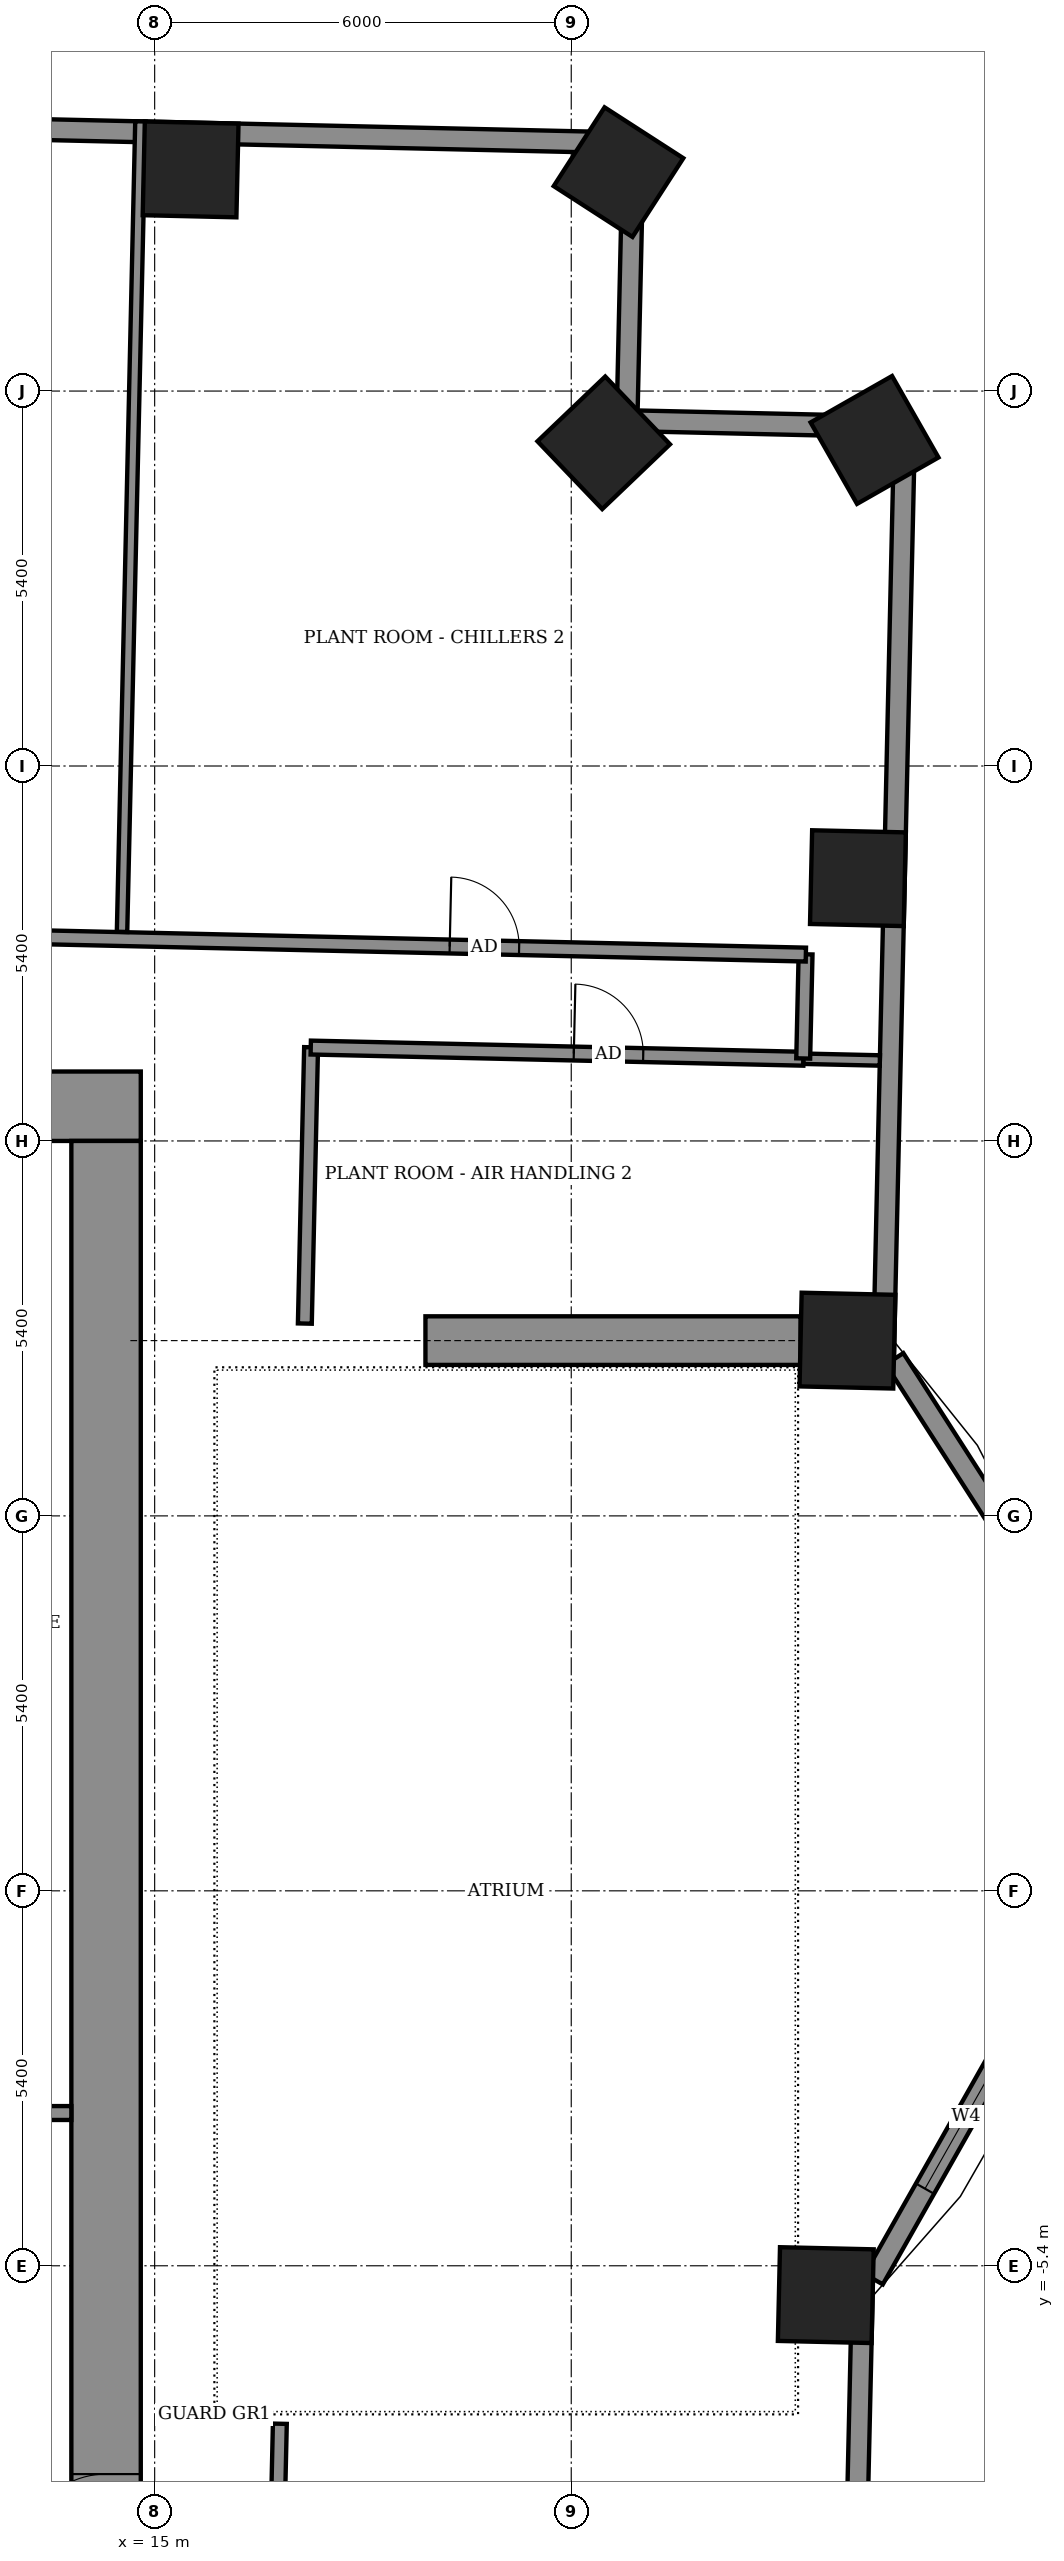
"""IFC4 building model, lengths in metres.
Left out: names, types, materials, properties, quantities, classifications, styles, units other than length and angle.
Written with IfcOpenShell. Run it as: python <this file> out.ifc"""

import sys

from ifc_helpers import new_model, si_unit, direction, frame, frame_2d, origin, origin_2d, place, context, subcontext, project, spatial, rectangle, extrude, element, fill, save


model = new_model("IFC4")
c1 = context("Model", 3, precision=1e-05, world=origin(), true_north=direction((0.0, 1.0)))
c2 = subcontext(c1, "Body", "Model", "MODEL_VIEW")
j1 = project(units=[si_unit("LENGTHUNIT", "METRE"), si_unit("PLANEANGLEUNIT", "RADIAN")], contexts=[c1])
p1 = place(None, origin())
s1 = spatial("IfcSite", under=j1, at=p1, CompositionType="ELEMENT")
p2 = place(p1, origin())
s2 = spatial("IfcBuilding", under=s1, at=p2, CompositionType="ELEMENT")
p3 = place(p2, frame((0.0, 0.0, 119.9)))
s3 = spatial("IfcBuildingStorey", under=s2, at=p3, CompositionType="ELEMENT", Elevation=119.9)
for number, where, z_axis, x_axis in (
    (1, (24.666, -5.823, -0.55), (0.0, 0.0, 1.0), (0.023, 1.0, 0.0)),
    (2, (24.978, 7.924, -0.55), (0.0, 0.0, 1.0), (0.023, 1.0, 0.0)),
    (3, (25.129, 14.584, -0.55), (0.0, 0.0, 1.0), (0.023, 1.0, 0.0)),
    (4, (25.369, 20.896, -0.55), (0.0, 0.0, 1.0), (-0.495, 0.869, 0.0)),
    (5, (21.468, 20.855, -0.55), (0.0, 0.0, 1.0), (-0.691, 0.723, 0.0)),
    (6, (21.681, 24.753, -0.55), (0.0, 0.0, 1.0), (-0.84, 0.542, 0.0)),
    (7, (15.518, 24.792, -0.55), (0.0, 0.0, 1.0), (-1.0, 0.023, 0.0)),
):
    element("IfcColumn", number, at=place(p3, frame(where, z_axis=z_axis, x_axis=x_axis)), inside=s3, PredefinedType="COLUMN", context=c2, shape_type="SweptSolid", body=[
        extrude(rectangle(XDim=1.35, YDim=1.35, at=origin_2d()), origin(), (0.0, 0.0, 1.0), 5.6),
    ])
p4 = place(p3, frame((18.9, 7.924, 0.0), z_axis=(0.0, 0.0, 1.0), x_axis=(1.0, 0.0, 0.0)))
e8 = element("IfcWall", 8, at=p4, inside=s3, PredefinedType="SHEAR", context=c2, shape_type="SweptSolid", body=[
    extrude(rectangle(XDim=5.403, YDim=0.7, at=frame_2d((2.702, 0.0))), origin(), (0.0, 0.0, 1.0), 3.0),
])
p5 = place(p3, frame((24.915, -18.007, 0.0), z_axis=(0.0, 0.0, 1.0), x_axis=(0.02263706344, 0.999743748847, 0.0)))
e9 = element("IfcWall", 9, at=p5, inside=s3, PredefinedType="SOLIDWALL", context=c2, shape_type="SweptSolid", body=[
    extrude(rectangle(XDim=12.23, YDim=0.3, at=frame_2d((6.115, 0.0))), origin(), (0.0, 0.0, 1.0), 5.05),
])
p6 = place(p3, frame((25.357, -5.594, 0.0), z_axis=(0.0, 0.0, 1.0), x_axis=(0.492589172415, 0.8702619762, 0.0)))
e10 = element("IfcWall", 10, at=p6, inside=s3, PredefinedType="SOLIDWALL", context=c2, shape_type="SweptSolid", body=[
    extrude(rectangle(XDim=5.398, YDim=0.3, at=frame_2d((2.699, 0.0))), origin(), (0.0, 0.0, 1.0), 5.05),
])
p7 = place(p6, frame((1.499, 0.0, 0.6)))
e11 = element("IfcOpeningElement", 11, at=p7, cuts=e10, PredefinedType="OPENING", context=c2, shape_type="SweptSolid", body=[
    extrude(rectangle(XDim=2.4, YDim=3.0, at=frame_2d((1.2, 1.5))), frame((0.0, 0.16, 0.0), z_axis=(0.0, -1.0, 0.0), x_axis=(1.0, 0.0, 0.0)), (0.0, 0.0, 1.0), 0.32),
])
p8 = place(p3, frame((27.586, 4.661, 0.0), z_axis=(0.0, 0.0, 1.0), x_axis=(-0.540553562828, 0.841309601582, 0.0)))
e12 = element("IfcWall", 12, at=p8, inside=s3, PredefinedType="SOLIDWALL", context=c2, shape_type="SweptSolid", body=[
    extrude(rectangle(XDim=3.568, YDim=0.3, at=frame_2d((1.784, 0.0))), origin(), (0.0, 0.0, 1.0), 5.05),
])
p9 = place(p3, frame((25.498, 7.691, 0.0), z_axis=(0.0, 0.0, 1.0), x_axis=(0.022690769161, 0.999742531352, 0.0)))
e13 = element("IfcWall", 13, at=p9, inside=s3, PredefinedType="SOLIDWALL", context=c2, shape_type="SweptSolid", body=[
    extrude(rectangle(XDim=13.396, YDim=0.3, at=frame_2d((6.698, 0.0))), origin(), (0.0, 0.0, 1.0), 5.05),
])
p10 = place(p3, frame((25.802, 21.083, 0.0), z_axis=(0.0, 0.0, 1.0), x_axis=(-0.999740826251, 0.022765770952, 0.0)))
e14 = element("IfcWall", 14, at=p10, inside=s3, PredefinedType="SOLIDWALL", context=c2, shape_type="SweptSolid", body=[
    extrude(rectangle(XDim=4.0, YDim=0.3, at=frame_2d((2.0, 0.0))), origin(), (0.0, 0.0, 1.0), 5.05),
])
p11 = place(p3, frame((21.792, 20.688, 0.0), z_axis=(0.0, 0.0, 1.0), x_axis=(0.022747364896, 0.999741245218, 0.0)))
e15 = element("IfcWall", 15, at=p11, inside=s3, PredefinedType="SOLIDWALL", context=c2, shape_type="SweptSolid", body=[
    extrude(rectangle(XDim=4.486, YDim=0.3, at=frame_2d((2.243, 0.0))), origin(), (0.0, 0.0, 1.0), 5.05),
])
p12 = place(p3, frame((21.894, 25.173, 0.0), z_axis=(0.0, 0.0, 1.0), x_axis=(-0.999742661083, 0.022685052594, 0.0)))
e16 = element("IfcWall", 16, at=p12, inside=s3, PredefinedType="SOLIDWALL", context=c2, shape_type="SweptSolid", body=[
    extrude(rectangle(XDim=45.309, YDim=0.3, at=frame_2d((22.654, 0.0))), origin(), (0.0, 0.0, 1.0), 5.05),
])
p13 = place(p3, frame((16.711, -11.738, 0.0), z_axis=(0.0, 0.0, 1.0), x_axis=(0.022647716762, 0.999743507569, 0.0)))
e17 = element("IfcWall", 17, at=p13, inside=s3, PredefinedType="PARTITIONING", context=c2, shape_type="SweptSolid", body=[
    extrude(rectangle(XDim=4.064, YDim=0.2, at=frame_2d((2.032, 0.0))), origin(), (0.0, 0.0, 1.0), 3.0),
])
p14 = place(p3, frame((17.163, 8.17, 0.0), z_axis=(0.0, 0.0, 1.0), x_axis=(0.022573703938, 0.999745181479, 0.0)))
e18 = element("IfcWall", 18, at=p14, inside=s3, PredefinedType="PARTITIONING", context=c2, shape_type="SweptSolid", body=[
    extrude(rectangle(XDim=3.98, YDim=0.2, at=frame_2d((1.99, 0.0))), origin(), (0.0, 0.0, 1.0), 3.0),
])
p15 = place(p3, frame((17.248, 12.145, 0.0), z_axis=(0.0, 0.0, 1.0), x_axis=(0.999742350192, -0.022698749566, 0.0)))
e19 = element("IfcWall", 19, at=p15, inside=s3, PredefinedType="PARTITIONING", context=c2, shape_type="SweptSolid", body=[
    extrude(rectangle(XDim=7.099, YDim=0.2, at=frame_2d((3.549, 0.0))), origin(), (0.0, 0.0, 1.0), 5.05),
])
p16 = place(p15, frame((3.79, 0.0, 0.0)))
e20 = element("IfcOpeningElement", 20, at=p16, cuts=e19, PredefinedType="OPENING", context=c2, shape_type="SweptSolid", body=[
    extrude(rectangle(XDim=1.0, YDim=2.1, at=frame_2d((0.5, 1.05))), frame((0.0, 0.11, 0.0), z_axis=(0.0, -1.0, 0.0), x_axis=(1.0, 0.0, 0.0)), (0.0, 0.0, 1.0), 0.22),
])
p17 = place(p3, frame((24.345, 11.984, 0.0), z_axis=(0.0, 0.0, 1.0), x_axis=(0.9997438932, -0.022630687329, 0.0)))
e21 = element("IfcWall", 21, at=p17, inside=s3, PredefinedType="PARTITIONING", context=c2, shape_type="SweptSolid", body=[
    extrude(rectangle(XDim=1.1, YDim=0.15, at=frame_2d((0.55, 0.0))), origin(), (0.0, 0.0, 1.0), 4.45),
])
p18 = place(p3, frame((24.341, 11.988, 0.0), z_axis=(0.0, 0.0, 1.0), x_axis=(0.022617910375, 0.999744182344, 0.0)))
e22 = element("IfcWall", 22, at=p18, inside=s3, PredefinedType="PARTITIONING", context=c2, shape_type="SweptSolid", body=[
    extrude(rectangle(XDim=1.5, YDim=0.2, at=frame_2d((0.75, 0.0))), origin(), (0.0, 0.0, 1.0), 5.05),
])
p19 = place(p3, frame((9.251, 13.827, 0.0), z_axis=(0.0, 0.0, 1.0), x_axis=(0.999743033601, -0.022668629562, 0.0)))
e23 = element("IfcWall", 23, at=p19, inside=s3, PredefinedType="PARTITIONING", context=c2, shape_type="SweptSolid", body=[
    extrude(rectangle(XDim=15.132, YDim=0.2, at=frame_2d((7.566, 0.0))), origin(), (0.0, 0.0, 1.0), 3.0),
])
p20 = place(p19, frame((10.001, 0.0, 0.0)))
e24 = element("IfcOpeningElement", 24, at=p20, cuts=e23, PredefinedType="OPENING", context=c2, shape_type="SweptSolid", body=[
    extrude(rectangle(XDim=1.0, YDim=2.1, at=frame_2d((0.5, 1.05))), frame((0.0, 0.11, 0.0), z_axis=(0.0, -1.0, 0.0), x_axis=(1.0, 0.0, 0.0)), (0.0, 0.0, 1.0), 0.22),
])
p21 = place(p19, frame((2.146, 0.0, 0.0)))
e25 = element("IfcOpeningElement", 25, at=p21, cuts=e23, PredefinedType="OPENING", context=c2, shape_type="SweptSolid", body=[
    extrude(rectangle(XDim=1.0, YDim=2.1, at=frame_2d((0.5, 1.05))), frame((0.0, 0.11, 0.0), z_axis=(0.0, -1.0, 0.0), x_axis=(1.0, 0.0, 0.0)), (0.0, 0.0, 1.0), 0.22),
])
p22 = place(p3, frame((14.53, 13.811, 0.0), z_axis=(0.0, 0.0, 1.0), x_axis=(0.022687206857, 0.999742612198, 0.0)))
e26 = element("IfcWall", 26, at=p22, inside=s3, PredefinedType="PARTITIONING", context=c2, shape_type="SweptSolid", body=[
    extrude(rectangle(XDim=11.676, YDim=0.15, at=frame_2d((5.838, 0.0))), origin(), (0.0, 0.0, 1.0), 4.45),
])
p23 = place(p3, frame((-14.8, 11.3, 0.0), z_axis=(0.0, 0.0, 1.0), x_axis=(1.0, 0.0, 0.0)))
e27 = element("IfcWall", 27, at=p23, inside=s3, PredefinedType="SHEAR", context=c2, shape_type="SweptSolid", body=[
    extrude(rectangle(XDim=29.6, YDim=1.0, at=frame_2d((14.8, 0.0))), origin(), (0.0, 0.0, 1.0), 5.6),
])
p24 = place(p3, frame((14.3, -10.8, 0.0), z_axis=(0.0, 0.0, 1.0), x_axis=(0.0, 1.0, 0.0)))
e28 = element("IfcWall", 28, at=p24, inside=s3, PredefinedType="SHEAR", context=c2, shape_type="SweptSolid", body=[
    extrude(rectangle(XDim=21.6, YDim=1.0, at=frame_2d((10.8, 0.0))), origin(), (0.0, 0.0, 1.0), 5.6),
])
p25 = place(p24, frame((1.2, 0.0, 0.0)))
e29 = element("IfcOpeningElement", 29, at=p25, cuts=e28, PredefinedType="OPENING", context=c2, shape_type="SweptSolid", body=[
    extrude(rectangle(XDim=1.2, YDim=2.1, at=frame_2d((0.6, 1.05))), frame((0.0, 0.51, 0.0), z_axis=(0.0, -1.0, 0.0), x_axis=(1.0, 0.0, 0.0)), (0.0, 0.0, 1.0), 1.02),
])
p26 = place(p3, frame((10.9, -3.2, 0.0), z_axis=(0.0, 0.0, 1.0), x_axis=(1.0, 0.0, 0.0)))
e30 = element("IfcWall", 30, at=p26, inside=s3, PredefinedType="STANDARD", context=c2, shape_type="SweptSolid", body=[
    extrude(rectangle(XDim=2.9, YDim=0.2, at=frame_2d((1.45, 0.0))), origin(), (0.0, 0.0, 1.0), 5.05),
])
p27 = place(p26, frame((0.85, 0.0, 0.0)))
e31 = element("IfcOpeningElement", 31, at=p27, cuts=e30, PredefinedType="OPENING", context=c2, shape_type="SweptSolid", body=[
    extrude(rectangle(XDim=1.2, YDim=2.1, at=frame_2d((0.6, 1.05))), frame((0.0, 0.11, 0.0), z_axis=(0.0, -1.0, 0.0), x_axis=(1.0, 0.0, 0.0)), (0.0, 0.0, 1.0), 0.22),
])
p28 = place(p7, origin())
e32 = element("IfcWindow", 32, at=p28, inside=s3, PartitioningType="SINGLE_PANEL", PredefinedType="WINDOW", context=c2, shape_type="SweptSolid", body=[
    extrude(rectangle(XDim=2.4, YDim=3.0, at=frame_2d((1.2, 1.5))), frame((0.0, 0.03, 0.0), z_axis=(0.0, -1.0, 0.0), x_axis=(1.0, 0.0, 0.0)), (0.0, 0.0, 1.0), 0.06),
])
fill(e11, e32)
p29 = place(p16, origin())
e33 = element("IfcDoor", 33, at=p29, inside=s3, OperationType="SINGLE_SWING_LEFT", PredefinedType="DOOR", context=c2, shape_type="SweptSolid", body=[
    extrude(rectangle(XDim=1.0, YDim=2.1, at=frame_2d((0.5, 1.05))), frame((0.0, 0.025, 0.0), z_axis=(0.0, -1.0, 0.0), x_axis=(1.0, 0.0, 0.0)), (0.0, 0.0, 1.0), 0.05),
])
fill(e20, e33)
p30 = place(p20, origin())
e34 = element("IfcDoor", 34, at=p30, inside=s3, OperationType="SINGLE_SWING_RIGHT", PredefinedType="DOOR", context=c2, shape_type="SweptSolid", body=[
    extrude(rectangle(XDim=1.0, YDim=2.1, at=frame_2d((0.5, 1.05))), frame((0.0, 0.025, 0.0), z_axis=(0.0, -1.0, 0.0), x_axis=(1.0, 0.0, 0.0)), (0.0, 0.0, 1.0), 0.05),
])
fill(e24, e34)
p31 = place(p25, origin())
e35 = element("IfcDoor", 35, at=p31, inside=s3, OperationType="DOUBLE_DOOR_SINGLE_SWING", PredefinedType="DOOR", context=c2, shape_type="SweptSolid", body=[
    extrude(rectangle(XDim=1.2, YDim=2.1, at=frame_2d((0.6, 1.05))), frame((0.0, 0.025, 0.0), z_axis=(0.0, -1.0, 0.0), x_axis=(1.0, 0.0, 0.0)), (0.0, 0.0, 1.0), 0.05),
])
fill(e29, e35)
save(model, sys.argv[1])
